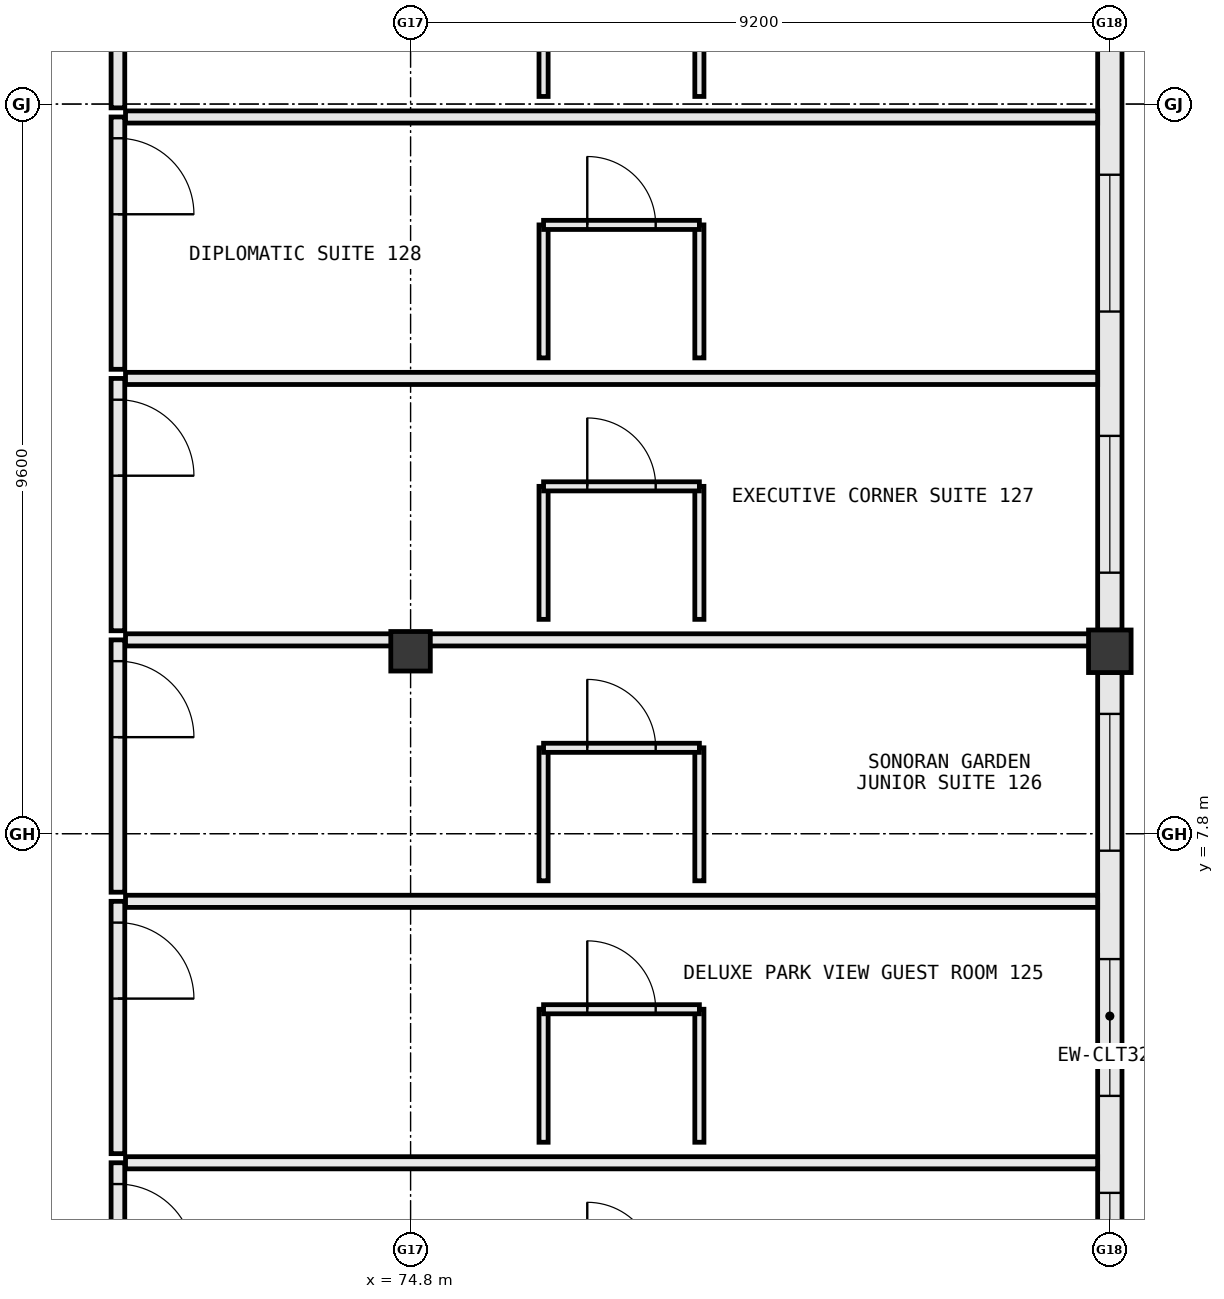
"""IFC4 building model, lengths in metres.
Left out: names, types, materials, properties, quantities, classifications, styles, units other than length and angle.
Written with IfcOpenShell. Run it as: python <this file> out.ifc"""

import sys

from ifc_helpers import new_model, si_unit, direction, frame, frame_2d, origin, origin_2d, place, context, subcontext, project, spatial, rectangle, extrude, element, fill, save


model = new_model("IFC4")
c1 = context("Model", 3, precision=1e-05, world=origin(), true_north=direction((0.0, 1.0)))
c2 = subcontext(c1, "Body", "Model", "MODEL_VIEW")
j1 = project(units=[si_unit("LENGTHUNIT", "METRE"), si_unit("PLANEANGLEUNIT", "RADIAN")], contexts=[c1])
p1 = place(None, origin())
s1 = spatial("IfcSite", under=j1, at=p1, CompositionType="ELEMENT")
p2 = place(p1, origin())
s2 = spatial("IfcBuilding", under=s1, at=p2, CompositionType="ELEMENT")
p3 = place(p2, frame((0.0, 0.0, 20.0)))
s3 = spatial("IfcBuildingStorey", under=s2, at=p3, CompositionType="ELEMENT", Elevation=20.0)
p4 = place(p3, frame((74.8, 10.2, 0.0), z_axis=(0.0, 0.0, 1.0), x_axis=(1.0, 0.0, 0.0)))
e1 = element("IfcColumn", 1, at=p4, inside=s3, PredefinedType="COLUMN", context=c2, shape_type="SweptSolid", body=[
    extrude(rectangle(XDim=0.52, YDim=0.52, at=origin_2d()), origin(), (0.0, 0.0, 1.0), 3.8),
])
p5 = place(p3, frame((84.0, 10.2, 0.0), z_axis=(0.0, 0.0, 1.0), x_axis=(1.0, 0.0, 0.0)))
e2 = element("IfcColumn", 2, at=p5, inside=s3, PredefinedType="COLUMN", context=c2, shape_type="SweptSolid", body=[
    extrude(rectangle(XDim=0.56, YDim=0.56, at=origin_2d()), origin(), (0.0, 0.0, 1.0), 3.8),
])
p6 = place(p3, frame((84.0, 0.878, 0.0), z_axis=(0.0, 0.0, 1.0), x_axis=(0.0, 1.0, 0.0)))
e3 = element("IfcWall", 3, at=p6, inside=s3, PredefinedType="STANDARD", context=c2, shape_type="SweptSolid", body=[
    extrude(rectangle(XDim=9.044, YDim=0.32, at=frame_2d((4.522, 0.0))), origin(), (0.0, 0.0, 1.0), 2.965),
])
p7 = place(p6, frame((0.396, 0.0, 0.85)))
e4 = element("IfcOpeningElement", 4, at=p7, cuts=e3, PredefinedType="OPENING", context=c2, shape_type="SweptSolid", body=[
    extrude(rectangle(XDim=1.8, YDim=1.85, at=frame_2d((0.9, 0.925))), frame((0.0, 0.172, 0.0), z_axis=(0.0, -1.0, 0.0), x_axis=(1.0, 0.0, 0.0)), (0.0, 0.0, 1.0), 0.344),
])
p8 = place(p6, frame((3.472, 0.0, 0.85)))
e5 = element("IfcOpeningElement", 5, at=p8, cuts=e3, PredefinedType="OPENING", context=c2, shape_type="SweptSolid", body=[
    extrude(rectangle(XDim=1.8, YDim=1.85, at=frame_2d((0.9, 0.925))), frame((0.0, 0.172, 0.0), z_axis=(0.0, -1.0, 0.0), x_axis=(1.0, 0.0, 0.0)), (0.0, 0.0, 1.0), 0.344),
])
p9 = place(p6, frame((6.698, 0.0, 0.85)))
e6 = element("IfcOpeningElement", 6, at=p9, cuts=e3, PredefinedType="OPENING", context=c2, shape_type="SweptSolid", body=[
    extrude(rectangle(XDim=1.8, YDim=1.85, at=frame_2d((0.9, 0.925))), frame((0.0, 0.172, 0.0), z_axis=(0.0, -1.0, 0.0), x_axis=(1.0, 0.0, 0.0)), (0.0, 0.0, 1.0), 0.344),
])
p10 = place(p3, frame((84.0, 10.478, 0.0), z_axis=(0.0, 0.0, 1.0), x_axis=(0.0, 1.0, 0.0)))
e7 = element("IfcWall", 7, at=p10, inside=s3, PredefinedType="STANDARD", context=c2, shape_type="SweptSolid", body=[
    extrude(rectangle(XDim=7.844, YDim=0.32, at=frame_2d((3.922, 0.0))), origin(), (0.0, 0.0, 1.0), 2.965),
])
p11 = place(p10, frame((0.756, 0.0, 0.85)))
e8 = element("IfcOpeningElement", 8, at=p11, cuts=e7, PredefinedType="OPENING", context=c2, shape_type="SweptSolid", body=[
    extrude(rectangle(XDim=1.8, YDim=1.85, at=frame_2d((0.9, 0.925))), frame((0.0, 0.172, 0.0), z_axis=(0.0, -1.0, 0.0), x_axis=(1.0, 0.0, 0.0)), (0.0, 0.0, 1.0), 0.344),
])
p12 = place(p10, frame((4.192, 0.0, 0.85)))
e9 = element("IfcOpeningElement", 9, at=p12, cuts=e7, PredefinedType="OPENING", context=c2, shape_type="SweptSolid", body=[
    extrude(rectangle(XDim=1.8, YDim=1.85, at=frame_2d((0.9, 0.925))), frame((0.0, 0.172, 0.0), z_axis=(0.0, -1.0, 0.0), x_axis=(1.0, 0.0, 0.0)), (0.0, 0.0, 1.0), 0.344),
])
p13 = place(p3, frame((70.95, 3.47, 0.0), z_axis=(0.0, 0.0, 1.0), x_axis=(0.0, -1.0, 0.0)))
e10 = element("IfcWall", 10, at=p13, inside=s3, PredefinedType="PARTITIONING", context=c2, shape_type="SweptSolid", body=[
    extrude(rectangle(XDim=3.32, YDim=0.18, at=frame_2d((1.66, 0.0))), origin(), (0.0, 0.0, 1.0), 3.55),
])
p14 = place(p13, frame((0.28, 0.0, 0.0)))
e11 = element("IfcOpeningElement", 11, at=p14, cuts=e10, PredefinedType="OPENING", context=c2, shape_type="SweptSolid", body=[
    extrude(rectangle(XDim=1.0, YDim=2.2, at=frame_2d((0.5, 1.1))), frame((0.0, 0.102, 0.0), z_axis=(0.0, -1.0, 0.0), x_axis=(1.0, 0.0, 0.0)), (0.0, 0.0, 1.0), 0.204),
])
p15 = place(p3, frame((71.05, 3.47, 0.0), z_axis=(0.0, 0.0, 1.0), x_axis=(1.0, 0.0, 0.0)))
e12 = element("IfcWall", 12, at=p15, inside=s3, PredefinedType="PARTITIONING", context=c2, shape_type="SweptSolid", body=[
    extrude(rectangle(XDim=12.79, YDim=0.16, at=frame_2d((6.395, 0.0))), origin(), (0.0, 0.0, 1.0), 3.55),
])
p16 = place(p3, frame((70.95, 6.91, 0.0), z_axis=(0.0, 0.0, 1.0), x_axis=(0.0, -1.0, 0.0)))
e13 = element("IfcWall", 13, at=p16, inside=s3, PredefinedType="PARTITIONING", context=c2, shape_type="SweptSolid", body=[
    extrude(rectangle(XDim=3.32, YDim=0.18, at=frame_2d((1.66, 0.0))), origin(), (0.0, 0.0, 1.0), 3.55),
])
p17 = place(p16, frame((0.28, 0.0, 0.0)))
e14 = element("IfcOpeningElement", 14, at=p17, cuts=e13, PredefinedType="OPENING", context=c2, shape_type="SweptSolid", body=[
    extrude(rectangle(XDim=1.0, YDim=2.2, at=frame_2d((0.5, 1.1))), frame((0.0, 0.102, 0.0), z_axis=(0.0, -1.0, 0.0), x_axis=(1.0, 0.0, 0.0)), (0.0, 0.0, 1.0), 0.204),
])
p18 = place(p3, frame((71.05, 6.91, 0.0), z_axis=(0.0, 0.0, 1.0), x_axis=(1.0, 0.0, 0.0)))
e15 = element("IfcWall", 15, at=p18, inside=s3, PredefinedType="PARTITIONING", context=c2, shape_type="SweptSolid", body=[
    extrude(rectangle(XDim=12.79, YDim=0.16, at=frame_2d((6.395, 0.0))), origin(), (0.0, 0.0, 1.0), 3.55),
])
for number, where, z_axis, x_axis in (
    (16, (76.55, 3.74, 0.0), (0.0, 0.0, 1.0), (0.0, 1.0, 0.0)),
    (17, (78.6, 3.74, 0.0), (0.0, 0.0, 1.0), (0.0, 1.0, 0.0)),
):
    element("IfcWall", number, at=place(p3, frame(where, z_axis=z_axis, x_axis=x_axis)), inside=s3, PredefinedType="PARTITIONING", context=c2, shape_type="SweptSolid", body=[
        extrude(rectangle(XDim=1.75, YDim=0.12, at=frame_2d((0.875, 0.0))), origin(), (0.0, 0.0, 1.0), 3.55),
    ])
p19 = place(p3, frame((76.55, 5.49, 0.0), z_axis=(0.0, 0.0, 1.0), x_axis=(1.0, 0.0, 0.0)))
e18 = element("IfcWall", 18, at=p19, inside=s3, PredefinedType="PARTITIONING", context=c2, shape_type="SweptSolid", body=[
    extrude(rectangle(XDim=2.05, YDim=0.12, at=frame_2d((1.025, 0.0))), origin(), (0.0, 0.0, 1.0), 3.55),
])
p20 = place(p19, frame((0.575, 0.0, 0.0)))
e19 = element("IfcOpeningElement", 19, at=p20, cuts=e18, PredefinedType="OPENING", context=c2, shape_type="SweptSolid", body=[
    extrude(rectangle(XDim=0.9, YDim=2.15, at=frame_2d((0.45, 1.075))), frame((0.0, 0.072, 0.0), z_axis=(0.0, -1.0, 0.0), x_axis=(1.0, 0.0, 0.0)), (0.0, 0.0, 1.0), 0.144),
])
p21 = place(p3, frame((70.95, 10.35, 0.0), z_axis=(0.0, 0.0, 1.0), x_axis=(0.0, -1.0, 0.0)))
e20 = element("IfcWall", 20, at=p21, inside=s3, PredefinedType="PARTITIONING", context=c2, shape_type="SweptSolid", body=[
    extrude(rectangle(XDim=3.32, YDim=0.18, at=frame_2d((1.66, 0.0))), origin(), (0.0, 0.0, 1.0), 3.55),
])
p22 = place(p21, frame((0.28, 0.0, 0.0)))
e21 = element("IfcOpeningElement", 21, at=p22, cuts=e20, PredefinedType="OPENING", context=c2, shape_type="SweptSolid", body=[
    extrude(rectangle(XDim=1.0, YDim=2.2, at=frame_2d((0.5, 1.1))), frame((0.0, 0.102, 0.0), z_axis=(0.0, -1.0, 0.0), x_axis=(1.0, 0.0, 0.0)), (0.0, 0.0, 1.0), 0.204),
])
p23 = place(p3, frame((71.05, 10.35, 0.0), z_axis=(0.0, 0.0, 1.0), x_axis=(1.0, 0.0, 0.0)))
e22 = element("IfcWall", 22, at=p23, inside=s3, PredefinedType="PARTITIONING", context=c2, shape_type="SweptSolid", body=[
    extrude(rectangle(XDim=12.79, YDim=0.16, at=frame_2d((6.395, 0.0))), origin(), (0.0, 0.0, 1.0), 2.905),
])
for number, where, z_axis, x_axis in (
    (23, (76.55, 7.18, 0.0), (0.0, 0.0, 1.0), (0.0, 1.0, 0.0)),
    (24, (78.6, 7.18, 0.0), (0.0, 0.0, 1.0), (0.0, 1.0, 0.0)),
):
    element("IfcWall", number, at=place(p3, frame(where, z_axis=z_axis, x_axis=x_axis)), inside=s3, PredefinedType="PARTITIONING", context=c2, shape_type="SweptSolid", body=[
        extrude(rectangle(XDim=1.75, YDim=0.12, at=frame_2d((0.875, 0.0))), origin(), (0.0, 0.0, 1.0), 3.55),
    ])
p24 = place(p3, frame((76.55, 8.93, 0.0), z_axis=(0.0, 0.0, 1.0), x_axis=(1.0, 0.0, 0.0)))
e25 = element("IfcWall", 25, at=p24, inside=s3, PredefinedType="PARTITIONING", context=c2, shape_type="SweptSolid", body=[
    extrude(rectangle(XDim=2.05, YDim=0.12, at=frame_2d((1.025, 0.0))), origin(), (0.0, 0.0, 1.0), 3.55),
])
p25 = place(p24, frame((0.575, 0.0, 0.0)))
e26 = element("IfcOpeningElement", 26, at=p25, cuts=e25, PredefinedType="OPENING", context=c2, shape_type="SweptSolid", body=[
    extrude(rectangle(XDim=0.9, YDim=2.15, at=frame_2d((0.45, 1.075))), frame((0.0, 0.072, 0.0), z_axis=(0.0, -1.0, 0.0), x_axis=(1.0, 0.0, 0.0)), (0.0, 0.0, 1.0), 0.144),
])
p26 = place(p3, frame((70.95, 13.79, 0.0), z_axis=(0.0, 0.0, 1.0), x_axis=(0.0, -1.0, 0.0)))
e27 = element("IfcWall", 27, at=p26, inside=s3, PredefinedType="PARTITIONING", context=c2, shape_type="SweptSolid", body=[
    extrude(rectangle(XDim=3.32, YDim=0.18, at=frame_2d((1.66, 0.0))), origin(), (0.0, 0.0, 1.0), 3.55),
])
p27 = place(p26, frame((0.28, 0.0, 0.0)))
e28 = element("IfcOpeningElement", 28, at=p27, cuts=e27, PredefinedType="OPENING", context=c2, shape_type="SweptSolid", body=[
    extrude(rectangle(XDim=1.0, YDim=2.2, at=frame_2d((0.5, 1.1))), frame((0.0, 0.102, 0.0), z_axis=(0.0, -1.0, 0.0), x_axis=(1.0, 0.0, 0.0)), (0.0, 0.0, 1.0), 0.204),
])
p28 = place(p3, frame((71.05, 13.79, 0.0), z_axis=(0.0, 0.0, 1.0), x_axis=(1.0, 0.0, 0.0)))
e29 = element("IfcWall", 29, at=p28, inside=s3, PredefinedType="PARTITIONING", context=c2, shape_type="SweptSolid", body=[
    extrude(rectangle(XDim=12.79, YDim=0.16, at=frame_2d((6.395, 0.0))), origin(), (0.0, 0.0, 1.0), 3.55),
])
for number, where, z_axis, x_axis in (
    (30, (76.55, 10.62, 0.0), (0.0, 0.0, 1.0), (0.0, 1.0, 0.0)),
    (31, (78.6, 10.62, 0.0), (0.0, 0.0, 1.0), (0.0, 1.0, 0.0)),
):
    element("IfcWall", number, at=place(p3, frame(where, z_axis=z_axis, x_axis=x_axis)), inside=s3, PredefinedType="PARTITIONING", context=c2, shape_type="SweptSolid", body=[
        extrude(rectangle(XDim=1.75, YDim=0.12, at=frame_2d((0.875, 0.0))), origin(), (0.0, 0.0, 1.0), 3.55),
    ])
p29 = place(p3, frame((76.55, 12.37, 0.0), z_axis=(0.0, 0.0, 1.0), x_axis=(1.0, 0.0, 0.0)))
e32 = element("IfcWall", 32, at=p29, inside=s3, PredefinedType="PARTITIONING", context=c2, shape_type="SweptSolid", body=[
    extrude(rectangle(XDim=2.05, YDim=0.12, at=frame_2d((1.025, 0.0))), origin(), (0.0, 0.0, 1.0), 3.55),
])
p30 = place(p29, frame((0.575, 0.0, 0.0)))
e33 = element("IfcOpeningElement", 33, at=p30, cuts=e32, PredefinedType="OPENING", context=c2, shape_type="SweptSolid", body=[
    extrude(rectangle(XDim=0.9, YDim=2.15, at=frame_2d((0.45, 1.075))), frame((0.0, 0.072, 0.0), z_axis=(0.0, -1.0, 0.0), x_axis=(1.0, 0.0, 0.0)), (0.0, 0.0, 1.0), 0.144),
])
p31 = place(p3, frame((70.95, 17.23, 0.0), z_axis=(0.0, 0.0, 1.0), x_axis=(0.0, -1.0, 0.0)))
e34 = element("IfcWall", 34, at=p31, inside=s3, PredefinedType="PARTITIONING", context=c2, shape_type="SweptSolid", body=[
    extrude(rectangle(XDim=3.32, YDim=0.18, at=frame_2d((1.66, 0.0))), origin(), (0.0, 0.0, 1.0), 3.55),
])
p32 = place(p31, frame((0.28, 0.0, 0.0)))
e35 = element("IfcOpeningElement", 35, at=p32, cuts=e34, PredefinedType="OPENING", context=c2, shape_type="SweptSolid", body=[
    extrude(rectangle(XDim=1.0, YDim=2.2, at=frame_2d((0.5, 1.1))), frame((0.0, 0.102, 0.0), z_axis=(0.0, -1.0, 0.0), x_axis=(1.0, 0.0, 0.0)), (0.0, 0.0, 1.0), 0.204),
])
p33 = place(p3, frame((71.05, 17.23, 0.0), z_axis=(0.0, 0.0, 1.0), x_axis=(1.0, 0.0, 0.0)))
e36 = element("IfcWall", 36, at=p33, inside=s3, PredefinedType="PARTITIONING", context=c2, shape_type="SweptSolid", body=[
    extrude(rectangle(XDim=12.79, YDim=0.16, at=frame_2d((6.395, 0.0))), origin(), (0.0, 0.0, 1.0), 3.55),
])
for number, where, z_axis, x_axis in (
    (37, (76.55, 14.06, 0.0), (0.0, 0.0, 1.0), (0.0, 1.0, 0.0)),
    (38, (78.6, 14.06, 0.0), (0.0, 0.0, 1.0), (0.0, 1.0, 0.0)),
):
    element("IfcWall", number, at=place(p3, frame(where, z_axis=z_axis, x_axis=x_axis)), inside=s3, PredefinedType="PARTITIONING", context=c2, shape_type="SweptSolid", body=[
        extrude(rectangle(XDim=1.75, YDim=0.12, at=frame_2d((0.875, 0.0))), origin(), (0.0, 0.0, 1.0), 3.55),
    ])
p34 = place(p3, frame((76.55, 15.81, 0.0), z_axis=(0.0, 0.0, 1.0), x_axis=(1.0, 0.0, 0.0)))
e39 = element("IfcWall", 39, at=p34, inside=s3, PredefinedType="PARTITIONING", context=c2, shape_type="SweptSolid", body=[
    extrude(rectangle(XDim=2.05, YDim=0.12, at=frame_2d((1.025, 0.0))), origin(), (0.0, 0.0, 1.0), 3.55),
])
p35 = place(p34, frame((0.575, 0.0, 0.0)))
e40 = element("IfcOpeningElement", 40, at=p35, cuts=e39, PredefinedType="OPENING", context=c2, shape_type="SweptSolid", body=[
    extrude(rectangle(XDim=0.9, YDim=2.15, at=frame_2d((0.45, 1.075))), frame((0.0, 0.072, 0.0), z_axis=(0.0, -1.0, 0.0), x_axis=(1.0, 0.0, 0.0)), (0.0, 0.0, 1.0), 0.144),
])
p36 = place(p3, frame((70.95, 20.67, 0.0), z_axis=(0.0, 0.0, 1.0), x_axis=(0.0, -1.0, 0.0)))
e41 = element("IfcWall", 41, at=p36, inside=s3, PredefinedType="PARTITIONING", context=c2, shape_type="SweptSolid", body=[
    extrude(rectangle(XDim=3.32, YDim=0.18, at=frame_2d((1.66, 0.0))), origin(), (0.0, 0.0, 1.0), 3.55),
])
p37 = place(p36, frame((0.28, 0.0, 0.0)))
e42 = element("IfcOpeningElement", 42, at=p37, cuts=e41, PredefinedType="OPENING", context=c2, shape_type="SweptSolid", body=[
    extrude(rectangle(XDim=1.0, YDim=2.2, at=frame_2d((0.5, 1.1))), frame((0.0, 0.102, 0.0), z_axis=(0.0, -1.0, 0.0), x_axis=(1.0, 0.0, 0.0)), (0.0, 0.0, 1.0), 0.204),
])
for number, where, z_axis, x_axis in (
    (43, (76.55, 17.5, 0.0), (0.0, 0.0, 1.0), (0.0, 1.0, 0.0)),
    (44, (78.6, 17.5, 0.0), (0.0, 0.0, 1.0), (0.0, 1.0, 0.0)),
):
    element("IfcWall", number, at=place(p3, frame(where, z_axis=z_axis, x_axis=x_axis)), inside=s3, PredefinedType="PARTITIONING", context=c2, shape_type="SweptSolid", body=[
        extrude(rectangle(XDim=1.75, YDim=0.12, at=frame_2d((0.875, 0.0))), origin(), (0.0, 0.0, 1.0), 3.55),
    ])
p38 = place(p7, origin())
e45 = element("IfcWindow", 45, at=p38, inside=s3, PartitioningType="SINGLE_PANEL", PredefinedType="WINDOW", context=c2, shape_type="SweptSolid", body=[
    extrude(rectangle(XDim=1.8, YDim=1.85, at=frame_2d((0.9, 0.925))), frame((0.0, 0.03, 0.0), z_axis=(0.0, -1.0, 0.0), x_axis=(1.0, 0.0, 0.0)), (0.0, 0.0, 1.0), 0.06),
])
fill(e4, e45)
p39 = place(p8, origin())
e46 = element("IfcWindow", 46, at=p39, inside=s3, PartitioningType="SINGLE_PANEL", PredefinedType="WINDOW", context=c2, shape_type="SweptSolid", body=[
    extrude(rectangle(XDim=1.8, YDim=1.85, at=frame_2d((0.9, 0.925))), frame((0.0, 0.03, 0.0), z_axis=(0.0, -1.0, 0.0), x_axis=(1.0, 0.0, 0.0)), (0.0, 0.0, 1.0), 0.06),
])
fill(e5, e46)
p40 = place(p9, origin())
e47 = element("IfcWindow", 47, at=p40, inside=s3, PartitioningType="SINGLE_PANEL", PredefinedType="WINDOW", context=c2, shape_type="SweptSolid", body=[
    extrude(rectangle(XDim=1.8, YDim=1.85, at=frame_2d((0.9, 0.925))), frame((0.0, 0.03, 0.0), z_axis=(0.0, -1.0, 0.0), x_axis=(1.0, 0.0, 0.0)), (0.0, 0.0, 1.0), 0.06),
])
fill(e6, e47)
p41 = place(p11, origin())
e48 = element("IfcWindow", 48, at=p41, inside=s3, PartitioningType="SINGLE_PANEL", PredefinedType="WINDOW", context=c2, shape_type="SweptSolid", body=[
    extrude(rectangle(XDim=1.8, YDim=1.85, at=frame_2d((0.9, 0.925))), frame((0.0, 0.03, 0.0), z_axis=(0.0, -1.0, 0.0), x_axis=(1.0, 0.0, 0.0)), (0.0, 0.0, 1.0), 0.06),
])
fill(e8, e48)
p42 = place(p12, origin())
e49 = element("IfcWindow", 49, at=p42, inside=s3, PartitioningType="SINGLE_PANEL", PredefinedType="WINDOW", context=c2, shape_type="SweptSolid", body=[
    extrude(rectangle(XDim=1.8, YDim=1.85, at=frame_2d((0.9, 0.925))), frame((0.0, 0.03, 0.0), z_axis=(0.0, -1.0, 0.0), x_axis=(1.0, 0.0, 0.0)), (0.0, 0.0, 1.0), 0.06),
])
fill(e9, e49)
p43 = place(p14, origin())
e50 = element("IfcDoor", 50, at=p43, inside=s3, OperationType="SINGLE_SWING_RIGHT", PredefinedType="DOOR", context=c2, shape_type="SweptSolid", body=[
    extrude(rectangle(XDim=1.0, YDim=2.2, at=frame_2d((0.5, 1.1))), frame((0.0, 0.025, 0.0), z_axis=(0.0, -1.0, 0.0), x_axis=(1.0, 0.0, 0.0)), (0.0, 0.0, 1.0), 0.05),
])
fill(e11, e50)
p44 = place(p17, origin())
e51 = element("IfcDoor", 51, at=p44, inside=s3, OperationType="SINGLE_SWING_RIGHT", PredefinedType="DOOR", context=c2, shape_type="SweptSolid", body=[
    extrude(rectangle(XDim=1.0, YDim=2.2, at=frame_2d((0.5, 1.1))), frame((0.0, 0.025, 0.0), z_axis=(0.0, -1.0, 0.0), x_axis=(1.0, 0.0, 0.0)), (0.0, 0.0, 1.0), 0.05),
])
fill(e14, e51)
p45 = place(p20, origin())
e52 = element("IfcDoor", 52, at=p45, inside=s3, OperationType="SINGLE_SWING_LEFT", PredefinedType="DOOR", context=c2, shape_type="SweptSolid", body=[
    extrude(rectangle(XDim=0.9, YDim=2.15, at=frame_2d((0.45, 1.075))), frame((0.0, 0.025, 0.0), z_axis=(0.0, -1.0, 0.0), x_axis=(1.0, 0.0, 0.0)), (0.0, 0.0, 1.0), 0.05),
])
fill(e19, e52)
p46 = place(p22, origin())
e53 = element("IfcDoor", 53, at=p46, inside=s3, OperationType="SINGLE_SWING_RIGHT", PredefinedType="DOOR", context=c2, shape_type="SweptSolid", body=[
    extrude(rectangle(XDim=1.0, YDim=2.2, at=frame_2d((0.5, 1.1))), frame((0.0, 0.025, 0.0), z_axis=(0.0, -1.0, 0.0), x_axis=(1.0, 0.0, 0.0)), (0.0, 0.0, 1.0), 0.05),
])
fill(e21, e53)
p47 = place(p25, origin())
e54 = element("IfcDoor", 54, at=p47, inside=s3, OperationType="SINGLE_SWING_LEFT", PredefinedType="DOOR", context=c2, shape_type="SweptSolid", body=[
    extrude(rectangle(XDim=0.9, YDim=2.15, at=frame_2d((0.45, 1.075))), frame((0.0, 0.025, 0.0), z_axis=(0.0, -1.0, 0.0), x_axis=(1.0, 0.0, 0.0)), (0.0, 0.0, 1.0), 0.05),
])
fill(e26, e54)
p48 = place(p27, origin())
e55 = element("IfcDoor", 55, at=p48, inside=s3, OperationType="SINGLE_SWING_RIGHT", PredefinedType="DOOR", context=c2, shape_type="SweptSolid", body=[
    extrude(rectangle(XDim=1.0, YDim=2.2, at=frame_2d((0.5, 1.1))), frame((0.0, 0.025, 0.0), z_axis=(0.0, -1.0, 0.0), x_axis=(1.0, 0.0, 0.0)), (0.0, 0.0, 1.0), 0.05),
])
fill(e28, e55)
p49 = place(p30, origin())
e56 = element("IfcDoor", 56, at=p49, inside=s3, OperationType="SINGLE_SWING_LEFT", PredefinedType="DOOR", context=c2, shape_type="SweptSolid", body=[
    extrude(rectangle(XDim=0.9, YDim=2.15, at=frame_2d((0.45, 1.075))), frame((0.0, 0.025, 0.0), z_axis=(0.0, -1.0, 0.0), x_axis=(1.0, 0.0, 0.0)), (0.0, 0.0, 1.0), 0.05),
])
fill(e33, e56)
p50 = place(p32, origin())
e57 = element("IfcDoor", 57, at=p50, inside=s3, OperationType="SINGLE_SWING_RIGHT", PredefinedType="DOOR", context=c2, shape_type="SweptSolid", body=[
    extrude(rectangle(XDim=1.0, YDim=2.2, at=frame_2d((0.5, 1.1))), frame((0.0, 0.025, 0.0), z_axis=(0.0, -1.0, 0.0), x_axis=(1.0, 0.0, 0.0)), (0.0, 0.0, 1.0), 0.05),
])
fill(e35, e57)
p51 = place(p35, origin())
e58 = element("IfcDoor", 58, at=p51, inside=s3, OperationType="SINGLE_SWING_LEFT", PredefinedType="DOOR", context=c2, shape_type="SweptSolid", body=[
    extrude(rectangle(XDim=0.9, YDim=2.15, at=frame_2d((0.45, 1.075))), frame((0.0, 0.025, 0.0), z_axis=(0.0, -1.0, 0.0), x_axis=(1.0, 0.0, 0.0)), (0.0, 0.0, 1.0), 0.05),
])
fill(e40, e58)
save(model, sys.argv[1])
